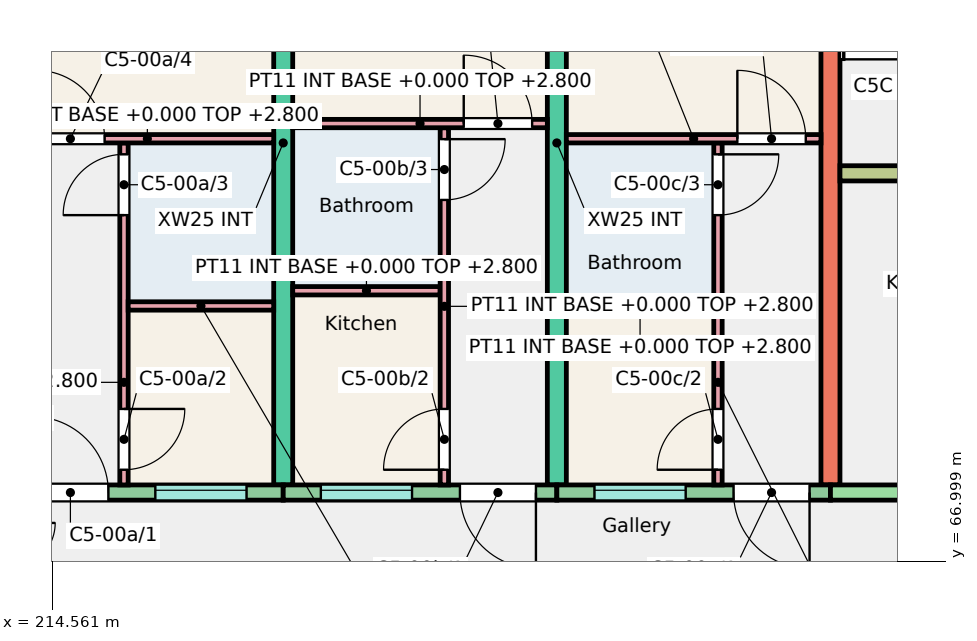
"""IFC4 building model, lengths in metres.
Left out: names, types, materials, properties, quantities, classifications, styles, units other than length and angle.
Written with IfcOpenShell. Run it as: python <this file> out.ifc"""

import sys

from ifc_helpers import new_model, si_unit, direction, frame, frame_2d, origin, place, context, subcontext, project, spatial, rectangle, extrude, element, fill, save


model = new_model("IFC4")
c1 = context("Model", 3, precision=1e-05, world=origin(), true_north=direction((0.0, 1.0)))
c2 = subcontext(c1, "Body", "Model", "MODEL_VIEW")
j1 = project(units=[si_unit("LENGTHUNIT", "METRE"), si_unit("PLANEANGLEUNIT", "RADIAN")], contexts=[c1])
p1 = place(None, origin())
s1 = spatial("IfcSite", under=j1, at=p1, CompositionType="ELEMENT")
p2 = place(p1, origin())
s2 = spatial("IfcBuilding", under=s1, at=p2, CompositionType="ELEMENT")
p3 = place(p2, origin())
s3 = spatial("IfcBuildingStorey", under=s2, at=p3, CompositionType="ELEMENT", Elevation=0.0)
for number, where, z_axis, x_axis in (
    (1, (217.6, 68.0, -0.25), (0.0, 0.0, 1.0), (0.0, 1.0, 0.0)),
    (2, (221.2, 68.0, -0.25), (0.0, 0.0, 1.0), (0.0, 1.0, 0.0)),
    (3, (224.8, 68.0, -0.25), (0.0, 0.0, 1.0), (0.0, 1.0, 0.0)),
):
    element("IfcWall", number, at=place(p3, frame(where, z_axis=z_axis, x_axis=x_axis)), inside=s3, PredefinedType="SHEAR", context=c2, shape_type="SweptSolid", body=[
        extrude(rectangle(XDim=9.0, YDim=0.25, at=frame_2d((4.5, 0.0))), origin(), (0.0, 0.0, 1.0), 3.25),
    ])
p4 = place(p3, frame((214.15, 67.9, -0.25), z_axis=(0.0, 0.0, 1.0), x_axis=(1.0, 0.0, 0.0)))
e4 = element("IfcWall", 4, at=p4, inside=s3, PredefinedType="SOLIDWALL", context=c2, shape_type="SweptSolid", body=[
    extrude(rectangle(XDim=3.45, YDim=0.2, at=frame_2d((1.725, 0.0))), origin(), (0.0, 0.0, 1.0), 3.25),
])
p5 = place(p4, frame((1.768, 0.0, 1.35)))
e5 = element("IfcOpeningElement", 5, at=p5, cuts=e4, PredefinedType="OPENING", context=c2, shape_type="SweptSolid", body=[
    extrude(rectangle(XDim=1.2, YDim=1.3, at=frame_2d((0.6, 0.65))), frame((0.0, 0.11, 0.0), z_axis=(0.0, -1.0, 0.0), x_axis=(1.0, 0.0, 0.0)), (0.0, 0.0, 1.0), 0.22),
])
p6 = place(p4, frame((0.15, 0.0, 0.25)))
e6 = element("IfcOpeningElement", 6, at=p6, cuts=e4, PredefinedType="OPENING", context=c2, shape_type="SweptSolid", body=[
    extrude(rectangle(XDim=1.0, YDim=2.1, at=frame_2d((0.5, 1.05))), frame((0.0, 0.11, 0.0), z_axis=(0.0, -1.0, 0.0), x_axis=(1.0, 0.0, 0.0)), (0.0, 0.0, 1.0), 0.22),
])
p7 = place(p3, frame((217.6, 67.9, -0.25), z_axis=(0.0, 0.0, 1.0), x_axis=(1.0, 0.0, 0.0)))
e7 = element("IfcWall", 7, at=p7, inside=s3, PredefinedType="SOLIDWALL", context=c2, shape_type="SweptSolid", body=[
    extrude(rectangle(XDim=3.6, YDim=0.2, at=frame_2d((1.8, 0.0))), origin(), (0.0, 0.0, 1.0), 3.25),
])
p8 = place(p7, frame((0.495, 0.0, 1.35)))
e8 = element("IfcOpeningElement", 8, at=p8, cuts=e7, PredefinedType="OPENING", context=c2, shape_type="SweptSolid", body=[
    extrude(rectangle(XDim=1.2, YDim=1.3, at=frame_2d((0.6, 0.65))), frame((0.0, 0.11, 0.0), z_axis=(0.0, -1.0, 0.0), x_axis=(1.0, 0.0, 0.0)), (0.0, 0.0, 1.0), 0.22),
])
p9 = place(p7, frame((2.325, 0.0, 0.25)))
e9 = element("IfcOpeningElement", 9, at=p9, cuts=e7, PredefinedType="OPENING", context=c2, shape_type="SweptSolid", body=[
    extrude(rectangle(XDim=1.0, YDim=2.1, at=frame_2d((0.5, 1.05))), frame((0.0, 0.11, 0.0), z_axis=(0.0, -1.0, 0.0), x_axis=(1.0, 0.0, 0.0)), (0.0, 0.0, 1.0), 0.22),
])
p10 = place(p3, frame((221.2, 67.9, -0.25), z_axis=(0.0, 0.0, 1.0), x_axis=(1.0, 0.0, 0.0)))
e10 = element("IfcWall", 10, at=p10, inside=s3, PredefinedType="SOLIDWALL", context=c2, shape_type="SweptSolid", body=[
    extrude(rectangle(XDim=3.6, YDim=0.2, at=frame_2d((1.8, 0.0))), origin(), (0.0, 0.0, 1.0), 3.25),
])
p11 = place(p10, frame((0.495, 0.0, 1.35)))
e11 = element("IfcOpeningElement", 11, at=p11, cuts=e10, PredefinedType="OPENING", context=c2, shape_type="SweptSolid", body=[
    extrude(rectangle(XDim=1.2, YDim=1.3, at=frame_2d((0.6, 0.65))), frame((0.0, 0.11, 0.0), z_axis=(0.0, -1.0, 0.0), x_axis=(1.0, 0.0, 0.0)), (0.0, 0.0, 1.0), 0.22),
])
p12 = place(p10, frame((2.325, 0.0, 0.25)))
e12 = element("IfcOpeningElement", 12, at=p12, cuts=e10, PredefinedType="OPENING", context=c2, shape_type="SweptSolid", body=[
    extrude(rectangle(XDim=1.0, YDim=2.1, at=frame_2d((0.5, 1.05))), frame((0.0, 0.11, 0.0), z_axis=(0.0, -1.0, 0.0), x_axis=(1.0, 0.0, 0.0)), (0.0, 0.0, 1.0), 0.22),
])
p13 = place(p3, frame((224.8, 67.9, -0.25), z_axis=(0.0, 0.0, 1.0), x_axis=(1.0, 0.0, 0.0)))
e13 = element("IfcWall", 13, at=p13, inside=s3, PredefinedType="SHEAR", context=c2, shape_type="SweptSolid", body=[
    extrude(rectangle(XDim=5.85, YDim=0.2, at=frame_2d((2.925, 0.0))), origin(), (0.0, 0.0, 1.0), 3.25),
])
p14 = place(p13, frame((2.438, 0.0, 0.25)))
e14 = element("IfcOpeningElement", 14, at=p14, cuts=e13, PredefinedType="OPENING", context=c2, shape_type="SweptSolid", body=[
    extrude(rectangle(XDim=1.1, YDim=2.1, at=frame_2d((0.55, 1.05))), frame((0.0, 0.11, 0.0), z_axis=(0.0, -1.0, 0.0), x_axis=(1.0, 0.0, 0.0)), (0.0, 0.0, 1.0), 0.22),
])
p15 = place(p3, frame((224.925, 72.1, -0.25), z_axis=(0.0, 0.0, 1.0), x_axis=(1.0, 0.0, 0.0)))
e15 = element("IfcWall", 15, at=p15, inside=s3, PredefinedType="SHEAR", context=c2, shape_type="SweptSolid", body=[
    extrude(rectangle(XDim=5.725, YDim=0.2, at=frame_2d((2.862, 0.0))), origin(), (0.0, 0.0, 1.0), 3.25),
])
p16 = place(p15, frame((0.95, 0.0, 0.25)))
e16 = element("IfcOpeningElement", 16, at=p16, cuts=e15, PredefinedType="OPENING", context=c2, shape_type="SweptSolid", body=[
    extrude(rectangle(XDim=1.0, YDim=2.1, at=frame_2d((0.5, 1.05))), frame((0.0, 0.11, 0.0), z_axis=(0.0, -1.0, 0.0), x_axis=(1.0, 0.0, 0.0)), (0.0, 0.0, 1.0), 0.22),
])
p17 = place(p15, frame((3.863, 0.0, 0.25)))
e17 = element("IfcOpeningElement", 17, at=p17, cuts=e15, PredefinedType="OPENING", context=c2, shape_type="SweptSolid", body=[
    extrude(rectangle(XDim=1.1, YDim=2.1, at=frame_2d((0.55, 1.05))), frame((0.0, 0.11, 0.0), z_axis=(0.0, -1.0, 0.0), x_axis=(1.0, 0.0, 0.0)), (0.0, 0.0, 1.0), 0.22),
])
p18 = place(p3, frame((215.505, 68.0, 0.0), z_axis=(0.0, 0.0, 1.0), x_axis=(0.0, 1.0, 0.0)))
e18 = element("IfcWall", 18, at=p18, inside=s3, PredefinedType="PARTITIONING", context=c2, shape_type="SweptSolid", body=[
    extrude(rectangle(XDim=4.5, YDim=0.11, at=frame_2d((2.25, 0.0))), origin(), (0.0, 0.0, 1.0), 2.8),
])
p19 = place(p18, frame((0.2, 0.0, 0.0)))
e19 = element("IfcOpeningElement", 19, at=p19, cuts=e18, PredefinedType="OPENING", context=c2, shape_type="SweptSolid", body=[
    extrude(rectangle(XDim=0.8, YDim=2.1, at=frame_2d((0.4, 1.05))), frame((0.0, 0.065, 0.0), z_axis=(0.0, -1.0, 0.0), x_axis=(1.0, 0.0, 0.0)), (0.0, 0.0, 1.0), 0.13),
])
p20 = place(p18, frame((3.55, 0.0, 0.0)))
e20 = element("IfcOpeningElement", 20, at=p20, cuts=e18, PredefinedType="OPENING", context=c2, shape_type="SweptSolid", body=[
    extrude(rectangle(XDim=0.8, YDim=2.1, at=frame_2d((0.4, 1.05))), frame((0.0, 0.065, 0.0), z_axis=(0.0, -1.0, 0.0), x_axis=(1.0, 0.0, 0.0)), (0.0, 0.0, 1.0), 0.13),
])
p21 = place(p3, frame((215.56, 70.355, 0.0), z_axis=(0.0, 0.0, 1.0), x_axis=(1.0, 0.0, 0.0)))
e21 = element("IfcWall", 21, at=p21, inside=s3, PredefinedType="PARTITIONING", context=c2, shape_type="SweptSolid", body=[
    extrude(rectangle(XDim=1.915, YDim=0.11, at=frame_2d((0.958, 0.0))), origin(), (0.0, 0.0, 1.0), 2.8),
])
p22 = place(p3, frame((214.15, 72.555, 0.0), z_axis=(0.0, 0.0, 1.0), x_axis=(1.0, 0.0, 0.0)))
e22 = element("IfcWall", 22, at=p22, inside=s3, PredefinedType="PARTITIONING", context=c2, shape_type="SweptSolid", body=[
    extrude(rectangle(XDim=3.325, YDim=0.11, at=frame_2d((1.663, 0.0))), origin(), (0.0, 0.0, 1.0), 2.8),
])
p23 = place(p22, frame((0.2, 0.0, 0.0)))
e23 = element("IfcOpeningElement", 23, at=p23, cuts=e22, PredefinedType="OPENING", context=c2, shape_type="SweptSolid", body=[
    extrude(rectangle(XDim=0.9, YDim=2.1, at=frame_2d((0.45, 1.05))), frame((0.0, 0.065, 0.0), z_axis=(0.0, -1.0, 0.0), x_axis=(1.0, 0.0, 0.0)), (0.0, 0.0, 1.0), 0.13),
])
p24 = place(p3, frame((217.725, 70.555, 0.0), z_axis=(0.0, 0.0, 1.0), x_axis=(1.0, 0.0, 0.0)))
e24 = element("IfcWall", 24, at=p24, inside=s3, PredefinedType="PARTITIONING", context=c2, shape_type="SweptSolid", body=[
    extrude(rectangle(XDim=1.94, YDim=0.11, at=frame_2d((0.97, 0.0))), origin(), (0.0, 0.0, 1.0), 2.8),
])
p25 = place(p3, frame((219.72, 68.0, 0.0), z_axis=(0.0, 0.0, 1.0), x_axis=(0.0, 1.0, 0.0)))
e25 = element("IfcWall", 25, at=p25, inside=s3, PredefinedType="PARTITIONING", context=c2, shape_type="SweptSolid", body=[
    extrude(rectangle(XDim=4.7, YDim=0.11, at=frame_2d((2.35, 0.0))), origin(), (0.0, 0.0, 1.0), 2.8),
])
p26 = place(p25, frame((0.2, 0.0, 0.0)))
e26 = element("IfcOpeningElement", 26, at=p26, cuts=e25, PredefinedType="OPENING", context=c2, shape_type="SweptSolid", body=[
    extrude(rectangle(XDim=0.8, YDim=2.1, at=frame_2d((0.4, 1.05))), frame((0.0, 0.065, 0.0), z_axis=(0.0, -1.0, 0.0), x_axis=(1.0, 0.0, 0.0)), (0.0, 0.0, 1.0), 0.13),
])
p27 = place(p25, frame((3.75, 0.0, 0.0)))
e27 = element("IfcOpeningElement", 27, at=p27, cuts=e25, PredefinedType="OPENING", context=c2, shape_type="SweptSolid", body=[
    extrude(rectangle(XDim=0.8, YDim=2.1, at=frame_2d((0.4, 1.05))), frame((0.0, 0.065, 0.0), z_axis=(0.0, -1.0, 0.0), x_axis=(1.0, 0.0, 0.0)), (0.0, 0.0, 1.0), 0.13),
])
p28 = place(p3, frame((217.725, 72.755, 0.0), z_axis=(0.0, 0.0, 1.0), x_axis=(1.0, 0.0, 0.0)))
e28 = element("IfcWall", 28, at=p28, inside=s3, PredefinedType="PARTITIONING", context=c2, shape_type="SweptSolid", body=[
    extrude(rectangle(XDim=3.35, YDim=0.11, at=frame_2d((1.675, 0.0))), origin(), (0.0, 0.0, 1.0), 2.8),
])
p29 = place(p28, frame((2.25, 0.0, 0.0)))
e29 = element("IfcOpeningElement", 29, at=p29, cuts=e28, PredefinedType="OPENING", context=c2, shape_type="SweptSolid", body=[
    extrude(rectangle(XDim=0.9, YDim=2.1, at=frame_2d((0.45, 1.05))), frame((0.0, 0.065, 0.0), z_axis=(0.0, -1.0, 0.0), x_axis=(1.0, 0.0, 0.0)), (0.0, 0.0, 1.0), 0.13),
])
p30 = place(p3, frame((221.325, 70.355, 0.0), z_axis=(0.0, 0.0, 1.0), x_axis=(1.0, 0.0, 0.0)))
e30 = element("IfcWall", 30, at=p30, inside=s3, PredefinedType="PARTITIONING", context=c2, shape_type="SweptSolid", body=[
    extrude(rectangle(XDim=1.94, YDim=0.11, at=frame_2d((0.97, 0.0))), origin(), (0.0, 0.0, 1.0), 2.8),
])
p31 = place(p3, frame((223.32, 68.0, 0.0), z_axis=(0.0, 0.0, 1.0), x_axis=(0.0, 1.0, 0.0)))
e31 = element("IfcWall", 31, at=p31, inside=s3, PredefinedType="PARTITIONING", context=c2, shape_type="SweptSolid", body=[
    extrude(rectangle(XDim=4.5, YDim=0.11, at=frame_2d((2.25, 0.0))), origin(), (0.0, 0.0, 1.0), 2.8),
])
p32 = place(p31, frame((0.2, 0.0, 0.0)))
e32 = element("IfcOpeningElement", 32, at=p32, cuts=e31, PredefinedType="OPENING", context=c2, shape_type="SweptSolid", body=[
    extrude(rectangle(XDim=0.8, YDim=2.1, at=frame_2d((0.4, 1.05))), frame((0.0, 0.065, 0.0), z_axis=(0.0, -1.0, 0.0), x_axis=(1.0, 0.0, 0.0)), (0.0, 0.0, 1.0), 0.13),
])
p33 = place(p31, frame((3.55, 0.0, 0.0)))
e33 = element("IfcOpeningElement", 33, at=p33, cuts=e31, PredefinedType="OPENING", context=c2, shape_type="SweptSolid", body=[
    extrude(rectangle(XDim=0.8, YDim=2.1, at=frame_2d((0.4, 1.05))), frame((0.0, 0.065, 0.0), z_axis=(0.0, -1.0, 0.0), x_axis=(1.0, 0.0, 0.0)), (0.0, 0.0, 1.0), 0.13),
])
p34 = place(p3, frame((221.325, 72.555, 0.0), z_axis=(0.0, 0.0, 1.0), x_axis=(1.0, 0.0, 0.0)))
e34 = element("IfcWall", 34, at=p34, inside=s3, PredefinedType="PARTITIONING", context=c2, shape_type="SweptSolid", body=[
    extrude(rectangle(XDim=3.35, YDim=0.11, at=frame_2d((1.675, 0.0))), origin(), (0.0, 0.0, 1.0), 2.8),
])
p35 = place(p34, frame((2.25, 0.0, 0.0)))
e35 = element("IfcOpeningElement", 35, at=p35, cuts=e34, PredefinedType="OPENING", context=c2, shape_type="SweptSolid", body=[
    extrude(rectangle(XDim=0.9, YDim=2.1, at=frame_2d((0.45, 1.05))), frame((0.0, 0.065, 0.0), z_axis=(0.0, -1.0, 0.0), x_axis=(1.0, 0.0, 0.0)), (0.0, 0.0, 1.0), 0.13),
])
p36 = place(p5, origin())
e36 = element("IfcWindow", 36, at=p36, inside=s3, PartitioningType="SINGLE_PANEL", PredefinedType="WINDOW", context=c2, shape_type="SweptSolid", body=[
    extrude(rectangle(XDim=1.2, YDim=1.3, at=frame_2d((0.6, 0.65))), frame((0.0, 0.06, 0.0), z_axis=(0.0, -1.0, 0.0), x_axis=(1.0, 0.0, 0.0)), (0.0, 0.0, 1.0), 0.06),
])
fill(e5, e36)
p37 = place(p8, origin())
e37 = element("IfcWindow", 37, at=p37, inside=s3, PartitioningType="SINGLE_PANEL", PredefinedType="WINDOW", context=c2, shape_type="SweptSolid", body=[
    extrude(rectangle(XDim=1.2, YDim=1.3, at=frame_2d((0.6, 0.65))), frame((0.0, 0.06, 0.0), z_axis=(0.0, -1.0, 0.0), x_axis=(1.0, 0.0, 0.0)), (0.0, 0.0, 1.0), 0.06),
])
fill(e8, e37)
p38 = place(p11, origin())
e38 = element("IfcWindow", 38, at=p38, inside=s3, PartitioningType="SINGLE_PANEL", PredefinedType="WINDOW", context=c2, shape_type="SweptSolid", body=[
    extrude(rectangle(XDim=1.2, YDim=1.3, at=frame_2d((0.6, 0.65))), frame((0.0, 0.06, 0.0), z_axis=(0.0, -1.0, 0.0), x_axis=(1.0, 0.0, 0.0)), (0.0, 0.0, 1.0), 0.06),
])
fill(e11, e38)
p39 = place(p6, origin())
e39 = element("IfcDoor", 39, at=p39, inside=s3, OperationType="SINGLE_SWING_LEFT", PredefinedType="DOOR", context=c2, shape_type="SweptSolid", body=[
    extrude(rectangle(XDim=1.0, YDim=2.1, at=frame_2d((0.5, 1.05))), frame((0.0, 0.025, 0.0), z_axis=(0.0, -1.0, 0.0), x_axis=(1.0, 0.0, 0.0)), (0.0, 0.0, 1.0), 0.05),
])
fill(e6, e39)
p40 = place(p19, origin())
e40 = element("IfcDoor", 40, at=p40, inside=s3, OperationType="SINGLE_SWING_RIGHT", PredefinedType="DOOR", context=c2, shape_type="SweptSolid", body=[
    extrude(rectangle(XDim=0.8, YDim=2.1, at=frame_2d((0.4, 1.05))), frame((0.0, 0.025, 0.0), z_axis=(0.0, -1.0, 0.0), x_axis=(1.0, 0.0, 0.0)), (0.0, 0.0, 1.0), 0.05),
])
fill(e19, e40)
p41 = place(p20, origin())
e41 = element("IfcDoor", 41, at=p41, inside=s3, OperationType="SINGLE_SWING_LEFT", PredefinedType="DOOR", context=c2, shape_type="SweptSolid", body=[
    extrude(rectangle(XDim=0.8, YDim=2.1, at=frame_2d((0.4, 1.05))), frame((0.0, 0.025, 0.0), z_axis=(0.0, -1.0, 0.0), x_axis=(1.0, 0.0, 0.0)), (0.0, 0.0, 1.0), 0.05),
])
fill(e20, e41)
p42 = place(p23, origin())
e42 = element("IfcDoor", 42, at=p42, inside=s3, OperationType="SINGLE_SWING_LEFT", PredefinedType="DOOR", context=c2, shape_type="SweptSolid", body=[
    extrude(rectangle(XDim=0.9, YDim=2.1, at=frame_2d((0.45, 1.05))), frame((0.0, 0.025, 0.0), z_axis=(0.0, -1.0, 0.0), x_axis=(1.0, 0.0, 0.0)), (0.0, 0.0, 1.0), 0.05),
])
fill(e23, e42)
p43 = place(p9, origin())
e43 = element("IfcDoor", 43, at=p43, inside=s3, OperationType="SINGLE_SWING_RIGHT", PredefinedType="DOOR", context=c2, shape_type="SweptSolid", body=[
    extrude(rectangle(XDim=1.0, YDim=2.1, at=frame_2d((0.5, 1.05))), frame((0.0, 0.025, 0.0), z_axis=(0.0, -1.0, 0.0), x_axis=(1.0, 0.0, 0.0)), (0.0, 0.0, 1.0), 0.05),
])
fill(e9, e43)
p44 = place(p26, origin())
e44 = element("IfcDoor", 44, at=p44, inside=s3, OperationType="SINGLE_SWING_LEFT", PredefinedType="DOOR", context=c2, shape_type="SweptSolid", body=[
    extrude(rectangle(XDim=0.8, YDim=2.1, at=frame_2d((0.4, 1.05))), frame((0.0, 0.025, 0.0), z_axis=(0.0, -1.0, 0.0), x_axis=(1.0, 0.0, 0.0)), (0.0, 0.0, 1.0), 0.05),
])
fill(e26, e44)
p45 = place(p27, origin())
e45 = element("IfcDoor", 45, at=p45, inside=s3, OperationType="SINGLE_SWING_RIGHT", PredefinedType="DOOR", context=c2, shape_type="SweptSolid", body=[
    extrude(rectangle(XDim=0.8, YDim=2.1, at=frame_2d((0.4, 1.05))), frame((0.0, 0.025, 0.0), z_axis=(0.0, -1.0, 0.0), x_axis=(1.0, 0.0, 0.0)), (0.0, 0.0, 1.0), 0.05),
])
fill(e27, e45)
p46 = place(p29, origin())
e46 = element("IfcDoor", 46, at=p46, inside=s3, OperationType="SINGLE_SWING_LEFT", PredefinedType="DOOR", context=c2, shape_type="SweptSolid", body=[
    extrude(rectangle(XDim=0.9, YDim=2.1, at=frame_2d((0.45, 1.05))), frame((0.0, 0.025, 0.0), z_axis=(0.0, -1.0, 0.0), x_axis=(1.0, 0.0, 0.0)), (0.0, 0.0, 1.0), 0.05),
])
fill(e29, e46)
p47 = place(p12, origin())
e47 = element("IfcDoor", 47, at=p47, inside=s3, OperationType="SINGLE_SWING_RIGHT", PredefinedType="DOOR", context=c2, shape_type="SweptSolid", body=[
    extrude(rectangle(XDim=1.0, YDim=2.1, at=frame_2d((0.5, 1.05))), frame((0.0, 0.025, 0.0), z_axis=(0.0, -1.0, 0.0), x_axis=(1.0, 0.0, 0.0)), (0.0, 0.0, 1.0), 0.05),
])
fill(e12, e47)
p48 = place(p32, origin())
e48 = element("IfcDoor", 48, at=p48, inside=s3, OperationType="SINGLE_SWING_LEFT", PredefinedType="DOOR", context=c2, shape_type="SweptSolid", body=[
    extrude(rectangle(XDim=0.8, YDim=2.1, at=frame_2d((0.4, 1.05))), frame((0.0, 0.025, 0.0), z_axis=(0.0, -1.0, 0.0), x_axis=(1.0, 0.0, 0.0)), (0.0, 0.0, 1.0), 0.05),
])
fill(e32, e48)
p49 = place(p33, origin())
e49 = element("IfcDoor", 49, at=p49, inside=s3, OperationType="SINGLE_SWING_RIGHT", PredefinedType="DOOR", context=c2, shape_type="SweptSolid", body=[
    extrude(rectangle(XDim=0.8, YDim=2.1, at=frame_2d((0.4, 1.05))), frame((0.0, 0.025, 0.0), z_axis=(0.0, -1.0, 0.0), x_axis=(1.0, 0.0, 0.0)), (0.0, 0.0, 1.0), 0.05),
])
fill(e33, e49)
p50 = place(p35, origin())
e50 = element("IfcDoor", 50, at=p50, inside=s3, OperationType="SINGLE_SWING_LEFT", PredefinedType="DOOR", context=c2, shape_type="SweptSolid", body=[
    extrude(rectangle(XDim=0.9, YDim=2.1, at=frame_2d((0.45, 1.05))), frame((0.0, 0.025, 0.0), z_axis=(0.0, -1.0, 0.0), x_axis=(1.0, 0.0, 0.0)), (0.0, 0.0, 1.0), 0.05),
])
fill(e35, e50)
save(model, sys.argv[1])
